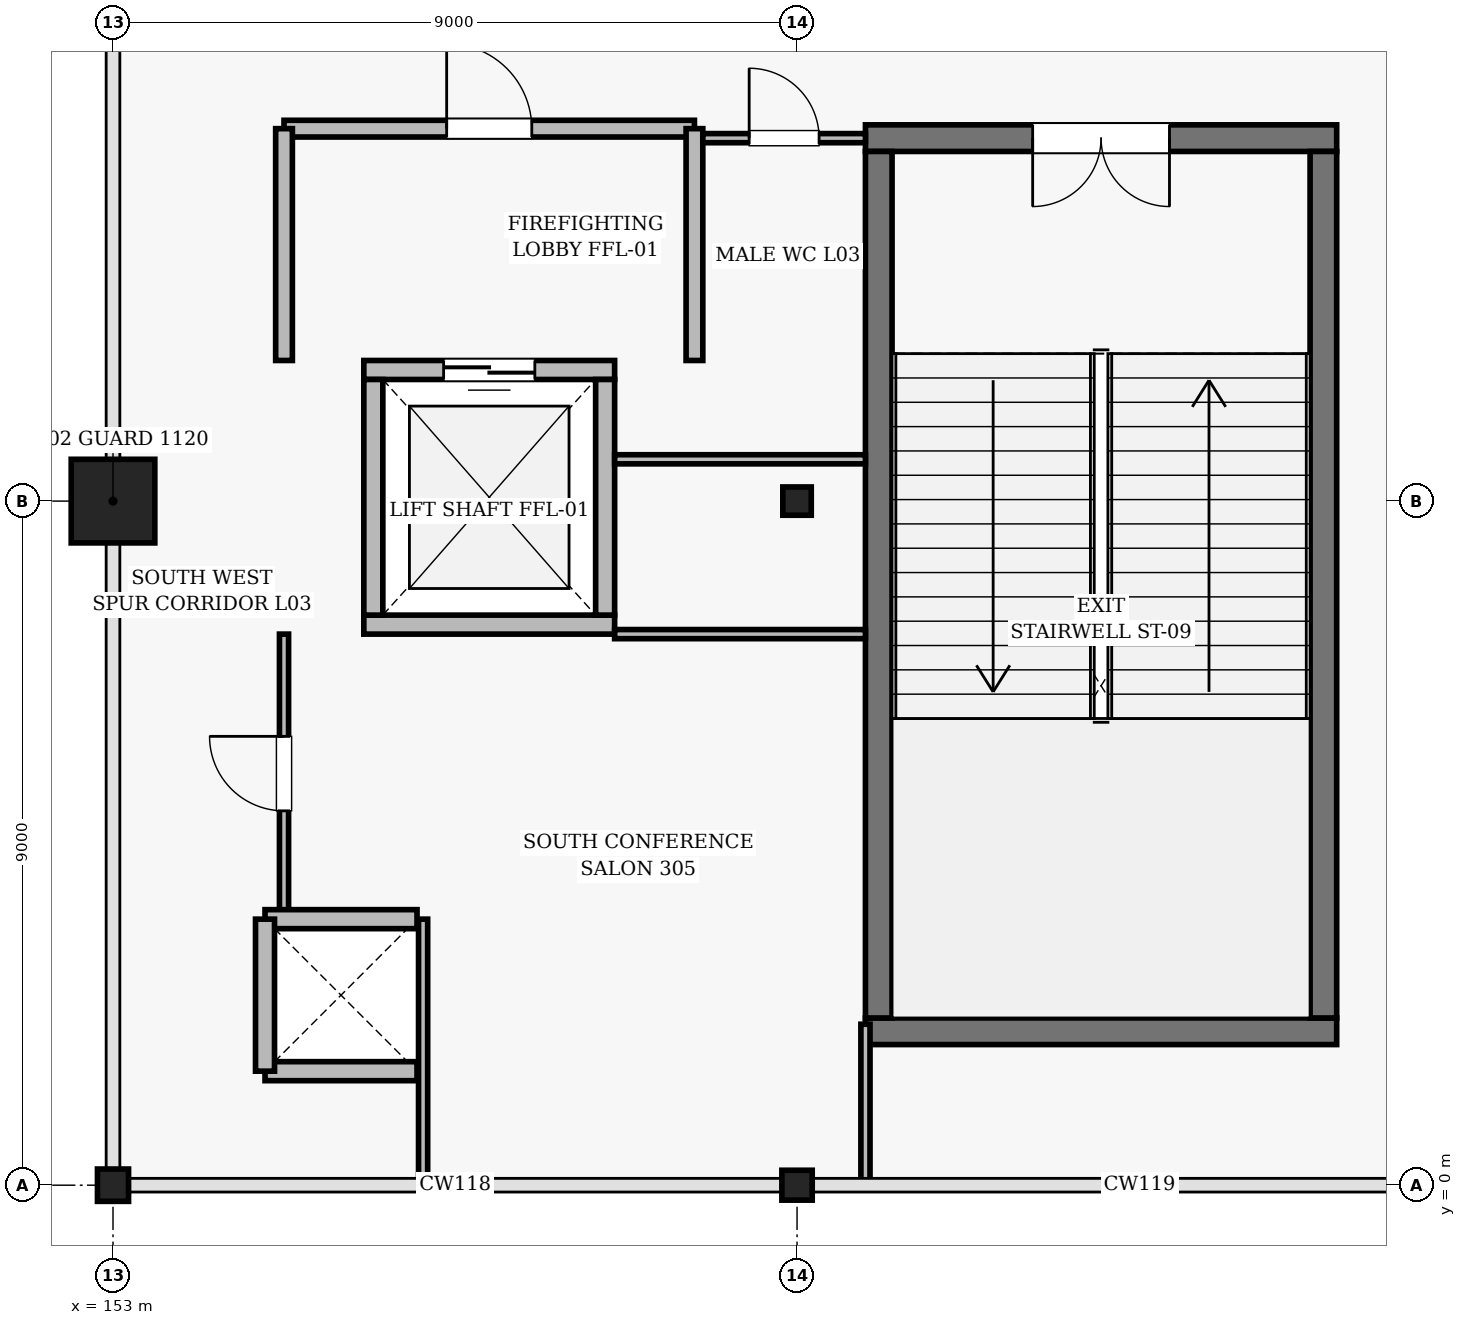
"""IFC4 building model, lengths in metres.
Left out: names, types, materials, properties, quantities, classifications, styles, units other than length and angle.
Written with IfcOpenShell. Run it as: python <this file> out.ifc"""

import sys

from ifc_helpers import new_model, si_unit, direction, frame, frame_2d, origin, origin_2d, place, context, subcontext, project, spatial, rectangle, i_section, extrude, element, fill, save


model = new_model("IFC4")
c1 = context("Model", 3, precision=1e-05, world=origin(), true_north=direction((0.0, 1.0)))
c2 = subcontext(c1, "Body", "Model", "MODEL_VIEW")
j1 = project(units=[si_unit("LENGTHUNIT", "METRE"), si_unit("PLANEANGLEUNIT", "RADIAN")], contexts=[c1])
p1 = place(None, origin())
s1 = spatial("IfcSite", under=j1, at=p1, CompositionType="ELEMENT")
p2 = place(p1, origin())
s2 = spatial("IfcBuilding", under=s1, at=p2, CompositionType="ELEMENT")
p3 = place(p2, frame((0.0, 0.0, 15.6)))
s3 = spatial("IfcBuildingStorey", under=s2, at=p3, CompositionType="ELEMENT", Elevation=15.6)
p4 = place(p3, frame((153.0, 0.0, 0.0), z_axis=(0.0, 0.0, 1.0), x_axis=(1.0, 0.0, 0.0)))
e1 = element("IfcColumn", 1, at=p4, inside=s3, PredefinedType="COLUMN", context=c2, shape_type="SweptSolid", body=[
    extrude(i_section(OverallWidth=0.409, OverallDepth=0.425, WebThickness=0.031, FlangeThickness=0.049, FilletRadius=0.02, at=origin_2d()), origin(), (0.0, 0.0, 1.0), 4.8),
])
p5 = place(p3, frame((153.0, 9.0, 0.0), z_axis=(0.0, 0.0, 1.0), x_axis=(1.0, 0.0, 0.0)))
e2 = element("IfcColumn", 2, at=p5, inside=s3, PredefinedType="COLUMN", context=c2, shape_type="SweptSolid", body=[
    extrude(rectangle(XDim=1.1, YDim=1.1, at=origin_2d()), origin(), (0.0, 0.0, 1.0), 4.8),
])
p6 = place(p3, frame((162.0, 0.0, 0.0), z_axis=(0.0, 0.0, 1.0), x_axis=(1.0, 0.0, 0.0)))
e3 = element("IfcColumn", 3, at=p6, inside=s3, PredefinedType="COLUMN", context=c2, shape_type="SweptSolid", body=[
    extrude(i_section(OverallWidth=0.399, OverallDepth=0.393, WebThickness=0.023, FlangeThickness=0.037, FilletRadius=0.018, at=origin_2d()), origin(), (0.0, 0.0, 1.0), 4.8),
])
p7 = place(p3, frame((162.0, 9.0, 0.0), z_axis=(0.0, 0.0, 1.0), x_axis=(1.0, 0.0, 0.0)))
e4 = element("IfcColumn", 4, at=p7, inside=s3, PredefinedType="COLUMN", context=c2, shape_type="SweptSolid", body=[
    extrude(i_section(OverallWidth=0.374, OverallDepth=0.372, WebThickness=0.016, FlangeThickness=0.026, FilletRadius=0.016, at=origin_2d()), origin(), (0.0, 0.0, 1.0), 4.8),
])
p8 = place(p3, frame((162.9, 2.025, 0.0), z_axis=(0.0, 0.0, 1.0), x_axis=(1.0, 0.0, 0.0)))
e5 = element("IfcWall", 5, at=p8, inside=s3, PredefinedType="SHEAR", context=c2, shape_type="SweptSolid", body=[
    extrude(rectangle(XDim=6.2, YDim=0.35, at=frame_2d((3.1, 0.0))), origin(), (0.0, 0.0, 1.0), 4.6),
])
p9 = place(p3, frame((169.1, 13.775, 0.0), z_axis=(0.0, 0.0, 1.0), x_axis=(-1.0, 0.0, 0.0)))
e6 = element("IfcWall", 6, at=p9, inside=s3, PredefinedType="SHEAR", context=c2, shape_type="SweptSolid", body=[
    extrude(rectangle(XDim=6.2, YDim=0.35, at=frame_2d((3.1, 0.0))), origin(), (0.0, 0.0, 1.0), 4.6),
])
p10 = place(p9, frame((2.2, 0.0, 0.0)))
e7 = element("IfcOpeningElement", 7, at=p10, cuts=e6, PredefinedType="OPENING", context=c2, shape_type="SweptSolid", body=[
    extrude(rectangle(XDim=1.8, YDim=2.2, at=frame_2d((0.9, 1.1))), frame((0.0, 0.185, 0.0), z_axis=(0.0, -1.0, 0.0), x_axis=(1.0, 0.0, 0.0)), (0.0, 0.0, 1.0), 0.37),
])
for number, where, z_axis, x_axis in (
    (8, (163.075, 13.6, 0.0), (0.0, 0.0, 1.0), (0.0, -1.0, 0.0)),
    (9, (168.925, 2.2, 0.0), (0.0, 0.0, 1.0), (0.0, 1.0, 0.0)),
):
    element("IfcWall", number, at=place(p3, frame(where, z_axis=z_axis, x_axis=x_axis)), inside=s3, PredefinedType="SHEAR", context=c2, shape_type="SweptSolid", body=[
        extrude(rectangle(XDim=11.4, YDim=0.35, at=frame_2d((5.7, 0.0))), origin(), (0.0, 0.0, 1.0), 4.6),
    ])
p11 = place(p3, frame((156.3, 7.375, 0.0), z_axis=(0.0, 0.0, 1.0), x_axis=(1.0, 0.0, 0.0)))
e10 = element("IfcWall", 10, at=p11, inside=s3, PredefinedType="SOLIDWALL", context=c2, shape_type="SweptSolid", body=[
    extrude(rectangle(XDim=3.3, YDim=0.25, at=frame_2d((1.65, 0.0))), origin(), (0.0, 0.0, 1.0), 4.6),
])
p12 = place(p3, frame((159.6, 10.725, 0.0), z_axis=(0.0, 0.0, 1.0), x_axis=(-1.0, 0.0, 0.0)))
e11 = element("IfcWall", 11, at=p12, inside=s3, PredefinedType="SOLIDWALL", context=c2, shape_type="SweptSolid", body=[
    extrude(rectangle(XDim=3.3, YDim=0.25, at=frame_2d((1.65, 0.0))), origin(), (0.0, 0.0, 1.0), 4.6),
])
p13 = place(p12, frame((1.05, 0.0, 0.0)))
e12 = element("IfcOpeningElement", 12, at=p13, cuts=e11, PredefinedType="OPENING", context=c2, shape_type="SweptSolid", body=[
    extrude(rectangle(XDim=1.2, YDim=2.25, at=frame_2d((0.6, 1.125))), frame((0.0, 0.135, 0.0), z_axis=(0.0, -1.0, 0.0), x_axis=(1.0, 0.0, 0.0)), (0.0, 0.0, 1.0), 0.27),
])
for number, where, z_axis, x_axis in (
    (13, (156.425, 10.6, 0.0), (0.0, 0.0, 1.0), (0.0, -1.0, 0.0)),
    (14, (159.475, 7.5, 0.0), (0.0, 0.0, 1.0), (0.0, 1.0, 0.0)),
):
    element("IfcWall", number, at=place(p3, frame(where, z_axis=z_axis, x_axis=x_axis)), inside=s3, PredefinedType="SOLIDWALL", context=c2, shape_type="SweptSolid", body=[
        extrude(rectangle(XDim=3.1, YDim=0.25, at=frame_2d((1.55, 0.0))), origin(), (0.0, 0.0, 1.0), 4.6),
    ])
p14 = place(p3, frame((155.25, 13.9, 0.0), z_axis=(0.0, 0.0, 1.0), x_axis=(1.0, 0.0, 0.0)))
e15 = element("IfcWall", 15, at=p14, inside=s3, PredefinedType="SOLIDWALL", context=c2, shape_type="SweptSolid", body=[
    extrude(rectangle(XDim=5.4, YDim=0.22, at=frame_2d((2.7, 0.0))), origin(), (0.0, 0.0, 1.0), 4.6),
])
p15 = place(p14, frame((2.14, 0.0, 0.0)))
e16 = element("IfcOpeningElement", 16, at=p15, cuts=e15, PredefinedType="OPENING", context=c2, shape_type="SweptSolid", body=[
    extrude(rectangle(XDim=1.12, YDim=2.2, at=frame_2d((0.56, 1.1))), frame((0.0, 0.12, 0.0), z_axis=(0.0, -1.0, 0.0), x_axis=(1.0, 0.0, 0.0)), (0.0, 0.0, 1.0), 0.24),
])
for number, where, z_axis, x_axis in (
    (17, (155.25, 10.85, 0.0), (0.0, 0.0, 1.0), (0.0, 1.0, 0.0)),
    (18, (160.65, 10.85, 0.0), (0.0, 0.0, 1.0), (0.0, 1.0, 0.0)),
):
    element("IfcWall", number, at=place(p3, frame(where, z_axis=z_axis, x_axis=x_axis)), inside=s3, PredefinedType="SOLIDWALL", context=c2, shape_type="SweptSolid", body=[
        extrude(rectangle(XDim=3.05, YDim=0.22, at=frame_2d((1.525, 0.0))), origin(), (0.0, 0.0, 1.0), 4.6),
    ])
p16 = place(p3, frame((160.76, 13.775, 0.0), z_axis=(0.0, 0.0, 1.0), x_axis=(1.0, 0.0, 0.0)))
e19 = element("IfcWall", 19, at=p16, inside=s3, PredefinedType="PARTITIONING", context=c2, shape_type="SweptSolid", body=[
    extrude(rectangle(XDim=2.14, YDim=0.12, at=frame_2d((1.07, 0.0))), origin(), (0.0, 0.0, 1.0), 3.901),
])
p17 = place(p16, frame((0.61, 0.0, 0.0)))
e20 = element("IfcOpeningElement", 20, at=p17, cuts=e19, PredefinedType="OPENING", context=c2, shape_type="SweptSolid", body=[
    extrude(rectangle(XDim=0.92, YDim=2.12, at=frame_2d((0.46, 1.06))), frame((0.0, 0.07, 0.0), z_axis=(0.0, -1.0, 0.0), x_axis=(1.0, 0.0, 0.0)), (0.0, 0.0, 1.0), 0.14),
])
p18 = place(p3, frame((162.9, 9.55, 0.0), z_axis=(0.0, 0.0, 1.0), x_axis=(-1.0, 0.0, 0.0)))
e21 = element("IfcWall", 21, at=p18, inside=s3, PredefinedType="PARTITIONING", context=c2, shape_type="SweptSolid", body=[
    extrude(rectangle(XDim=3.3, YDim=0.12, at=frame_2d((1.65, 0.0))), origin(), (0.0, 0.0, 1.0), 3.901),
])
p19 = place(p3, frame((159.6, 7.25, 0.0), z_axis=(0.0, 0.0, 1.0), x_axis=(1.0, 0.0, 0.0)))
e22 = element("IfcWall", 22, at=p19, inside=s3, PredefinedType="PARTITIONING", context=c2, shape_type="SweptSolid", body=[
    extrude(rectangle(XDim=3.3, YDim=0.12, at=frame_2d((1.65, 0.0))), origin(), (0.0, 0.0, 1.0), 3.89),
])
p20 = place(p3, frame((162.9, 2.117, 0.0), z_axis=(0.0, 0.0, 1.0), x_axis=(0.0, -1.0, 0.0)))
e23 = element("IfcWall", 23, at=p20, inside=s3, PredefinedType="PARTITIONING", context=c2, shape_type="SweptSolid", body=[
    extrude(rectangle(XDim=2.105, YDim=0.12, at=frame_2d((1.053, 0.0))), origin(), (0.0, 0.0, 1.0), 4.285),
])
p21 = place(p3, frame((157.08, 0.012, 0.0), z_axis=(0.0, 0.0, 1.0), x_axis=(0.0, 1.0, 0.0)))
e24 = element("IfcWall", 24, at=p21, inside=s3, PredefinedType="PARTITIONING", context=c2, shape_type="SweptSolid", body=[
    extrude(rectangle(XDim=3.488, YDim=0.12, at=frame_2d((1.744, 0.0))), origin(), (0.0, 0.0, 1.0), 4.119),
])
p22 = place(p3, frame((155.25, 3.58, 0.0), z_axis=(0.0, 0.0, 1.0), x_axis=(0.0, 1.0, 0.0)))
e25 = element("IfcWall", 25, at=p22, inside=s3, PredefinedType="PARTITIONING", context=c2, shape_type="SweptSolid", body=[
    extrude(rectangle(XDim=3.67, YDim=0.12, at=frame_2d((1.835, 0.0))), origin(), (0.0, 0.0, 1.0), 4.6),
])
p23 = place(p22, frame((1.345, 0.0, 0.0)))
e26 = element("IfcOpeningElement", 26, at=p23, cuts=e25, PredefinedType="OPENING", context=c2, shape_type="SweptSolid", body=[
    extrude(rectangle(XDim=0.98, YDim=2.15, at=frame_2d((0.49, 1.075))), frame((0.0, 0.07, 0.0), z_axis=(0.0, -1.0, 0.0), x_axis=(1.0, 0.0, 0.0)), (0.0, 0.0, 1.0), 0.14),
])
for number, where, z_axis, x_axis in (
    (27, (155.0, 1.5, 0.0), (0.0, 0.0, 1.0), (1.0, 0.0, 0.0)),
    (28, (157.0, 3.5, 0.0), (0.0, 0.0, 1.0), (-1.0, 0.0, 0.0)),
    (29, (155.0, 3.5, 0.0), (0.0, 0.0, 1.0), (0.0, -1.0, 0.0)),
):
    element("IfcWall", number, at=place(p3, frame(where, z_axis=z_axis, x_axis=x_axis)), inside=s3, PredefinedType="SOLIDWALL", context=c2, shape_type="SweptSolid", body=[
        extrude(rectangle(XDim=2.0, YDim=0.25, at=frame_2d((1.0, 0.0))), origin(), (0.0, 0.0, 1.0), 4.25),
    ])
p24 = place(p10, origin())
e30 = element("IfcDoor", 30, at=p24, inside=s3, OperationType="DOUBLE_DOOR_SINGLE_SWING", PredefinedType="DOOR", context=c2, shape_type="SweptSolid", body=[
    extrude(rectangle(XDim=1.8, YDim=2.2, at=frame_2d((0.9, 1.1))), frame((0.0, 0.025, 0.0), z_axis=(0.0, -1.0, 0.0), x_axis=(1.0, 0.0, 0.0)), (0.0, 0.0, 1.0), 0.05),
])
fill(e7, e30)
p25 = place(p13, origin())
e31 = element("IfcDoor", 31, at=p25, inside=s3, OperationType="DOUBLE_DOOR_SLIDING", PredefinedType="DOOR", context=c2, shape_type="SweptSolid", body=[
    extrude(rectangle(XDim=1.2, YDim=2.25, at=frame_2d((0.6, 1.125))), frame((0.0, 0.025, 0.0), z_axis=(0.0, -1.0, 0.0), x_axis=(1.0, 0.0, 0.0)), (0.0, 0.0, 1.0), 0.05),
])
fill(e12, e31)
p26 = place(p15, origin())
e32 = element("IfcDoor", 32, at=p26, inside=s3, OperationType="SINGLE_SWING_LEFT", PredefinedType="DOOR", context=c2, shape_type="SweptSolid", body=[
    extrude(rectangle(XDim=1.12, YDim=2.2, at=frame_2d((0.56, 1.1))), frame((0.0, 0.025, 0.0), z_axis=(0.0, -1.0, 0.0), x_axis=(1.0, 0.0, 0.0)), (0.0, 0.0, 1.0), 0.05),
])
fill(e16, e32)
p27 = place(p17, origin())
e33 = element("IfcDoor", 33, at=p27, inside=s3, OperationType="SINGLE_SWING_LEFT", PredefinedType="DOOR", context=c2, shape_type="SweptSolid", body=[
    extrude(rectangle(XDim=0.92, YDim=2.12, at=frame_2d((0.46, 1.06))), frame((0.0, 0.025, 0.0), z_axis=(0.0, -1.0, 0.0), x_axis=(1.0, 0.0, 0.0)), (0.0, 0.0, 1.0), 0.05),
])
fill(e20, e33)
p28 = place(p23, origin())
e34 = element("IfcDoor", 34, at=p28, inside=s3, OperationType="SINGLE_SWING_RIGHT", PredefinedType="DOOR", context=c2, shape_type="SweptSolid", body=[
    extrude(rectangle(XDim=0.98, YDim=2.15, at=frame_2d((0.49, 1.075))), frame((0.0, 0.025, 0.0), z_axis=(0.0, -1.0, 0.0), x_axis=(1.0, 0.0, 0.0)), (0.0, 0.0, 1.0), 0.05),
])
fill(e26, e34)
save(model, sys.argv[1])
